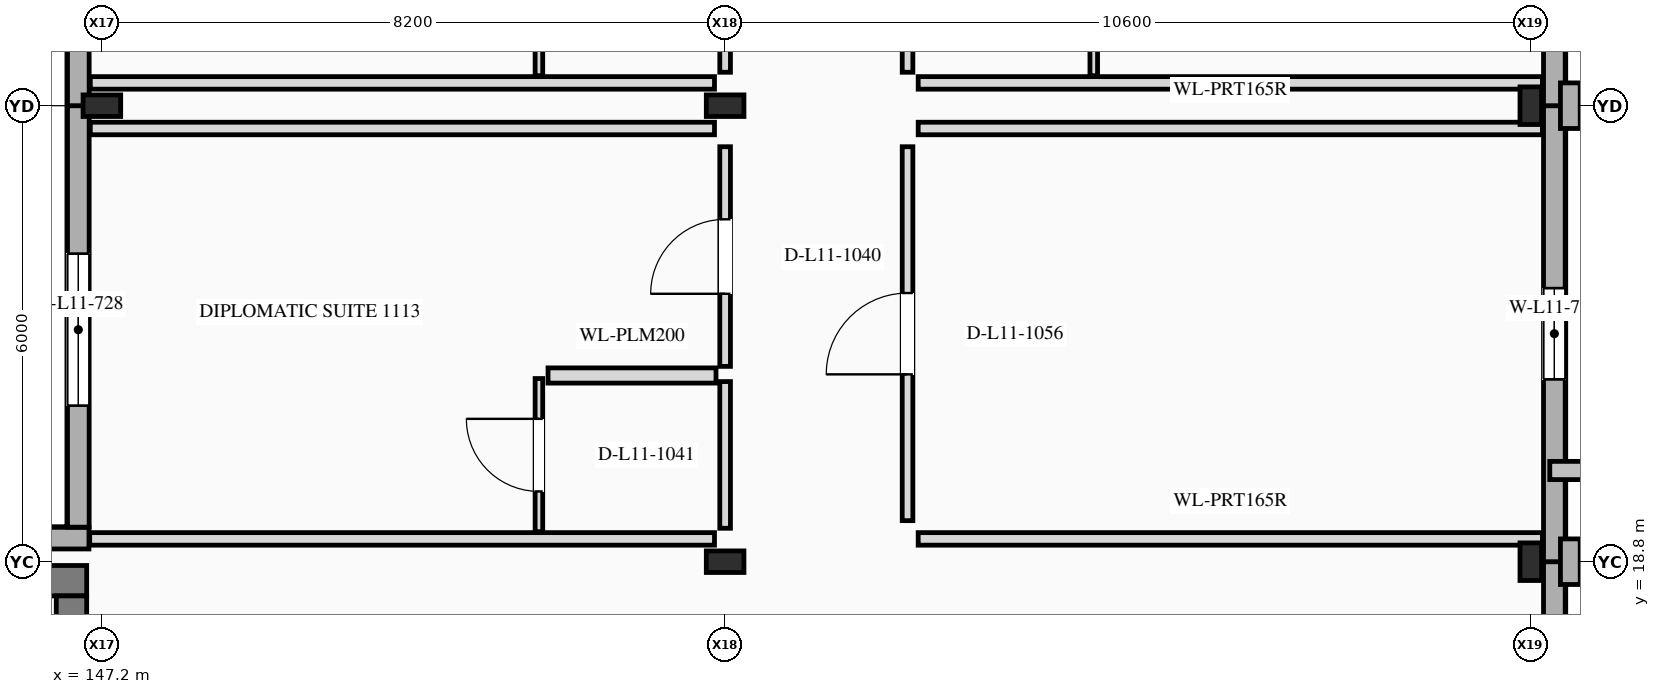
"""IFC4 building model, lengths in metres.
Left out: names, types, materials, properties, quantities, classifications, styles, units other than length and angle.
Written with IfcOpenShell. Run it as: python <this file> out.ifc"""

import sys

from ifc_helpers import new_model, si_unit, direction, frame, frame_2d, origin, origin_2d, place, context, subcontext, project, spatial, rectangle, i_section, extrude, element, fill, save


model = new_model("IFC4")
c1 = context("Model", 3, precision=1e-05, world=origin(), true_north=direction((0.0, 1.0)))
c2 = subcontext(c1, "Body", "Model", "MODEL_VIEW")
j1 = project(units=[si_unit("LENGTHUNIT", "METRE"), si_unit("PLANEANGLEUNIT", "RADIAN")], contexts=[c1])
p1 = place(None, origin())
s1 = spatial("IfcSite", under=j1, at=p1, CompositionType="ELEMENT")
p2 = place(p1, origin())
s2 = spatial("IfcBuilding", under=s1, at=p2, CompositionType="ELEMENT")
p3 = place(p2, frame((0.0, 0.0, 44.6)))
s3 = spatial("IfcBuildingStorey", under=s2, at=p3, CompositionType="ELEMENT", Elevation=44.6)
for number, where, z_axis, x_axis in (
    (1, (147.2, 24.8, 0.0), (0.0, 0.0, 1.0), (0.0, 1.0, 0.0)),
    (2, (155.4, 18.8, 0.0), (0.0, 0.0, 1.0), (0.0, 1.0, 0.0)),
    (3, (155.4, 24.8, 0.0), (0.0, 0.0, 1.0), (0.0, 1.0, 0.0)),
    (4, (166.0, 18.8, 0.0), (0.0, 0.0, 1.0), (1.0, 0.0, 0.0)),
    (5, (166.0, 24.8, 0.0), (0.0, 0.0, 1.0), (1.0, 0.0, 0.0)),
):
    element("IfcColumn", number, at=place(p3, frame(where, z_axis=z_axis, x_axis=x_axis)), inside=s3, PredefinedType="COLUMN", context=c2, shape_type="SweptSolid", body=[
        extrude(i_section(OverallWidth=0.284, OverallDepth=0.495, WebThickness=0.019, FlangeThickness=0.033, at=origin_2d()), origin(), (0.0, 0.0, 1.0), 3.6),
    ])
p4 = place(p3, frame((166.31, 8.2, 0.0), z_axis=(0.0, 0.0, 1.0), x_axis=(0.0, 1.0, 0.0)))
e6 = element("IfcWall", 6, at=p4, inside=s3, PredefinedType="STANDARD", context=c2, shape_type="SweptSolid", body=[
    extrude(rectangle(XDim=10.6, YDim=0.285, at=frame_2d((5.3, 0.0))), origin(), (0.0, 0.0, 1.0), 3.6),
])
p5 = place(p4, frame((4.55, 0.0, 0.88)))
e7 = element("IfcOpeningElement", 7, at=p5, cuts=e6, PredefinedType="OPENING", context=c2, shape_type="SweptSolid", body=[
    extrude(rectangle(XDim=1.5, YDim=1.7, at=frame_2d((0.75, 0.85))), frame((0.0, 0.152, 0.0), z_axis=(0.0, -1.0, 0.0), x_axis=(1.0, 0.0, 0.0)), (0.0, 0.0, 1.0), 0.305),
])
p6 = place(p3, frame((166.31, 18.8, 0.0), z_axis=(0.0, 0.0, 1.0), x_axis=(0.0, 1.0, 0.0)))
e8 = element("IfcWall", 8, at=p6, inside=s3, PredefinedType="STANDARD", context=c2, shape_type="SweptSolid", body=[
    extrude(rectangle(XDim=6.0, YDim=0.285, at=frame_2d((3.0, 0.0))), origin(), (0.0, 0.0, 1.0), 3.6),
])
p7 = place(p6, frame((2.4, 0.0, 0.85)))
e9 = element("IfcOpeningElement", 9, at=p7, cuts=e8, PredefinedType="OPENING", context=c2, shape_type="SweptSolid", body=[
    extrude(rectangle(XDim=1.2, YDim=1.6, at=frame_2d((0.6, 0.8))), frame((0.0, 0.152, 0.0), z_axis=(0.0, -1.0, 0.0), x_axis=(1.0, 0.0, 0.0)), (0.0, 0.0, 1.0), 0.305),
])
p8 = place(p3, frame((166.52, 18.5, 0.0), z_axis=(0.0, 0.0, 1.0), x_axis=(0.0, 1.0, 0.0)))
e10 = element("IfcWall", 10, at=p8, inside=s3, PredefinedType="ELEMENTEDWALL", context=c2, shape_type="SweptSolid", body=[
    extrude(rectangle(XDim=0.6, YDim=0.26, at=frame_2d((0.3, 0.0))), origin(), (0.0, 0.0, 1.0), 3.6),
])
p9 = place(p3, frame((166.31, 24.8, 0.0), z_axis=(0.0, 0.0, 1.0), x_axis=(0.0, 1.0, 0.0)))
e11 = element("IfcWall", 11, at=p9, inside=s3, PredefinedType="STANDARD", context=c2, shape_type="SweptSolid", body=[
    extrude(rectangle(XDim=8.4, YDim=0.285, at=frame_2d((4.2, 0.0))), origin(), (0.0, 0.0, 1.0), 3.6),
])
p10 = place(p9, frame((3.65, 0.0, 0.85)))
e12 = element("IfcOpeningElement", 12, at=p10, cuts=e11, PredefinedType="OPENING", context=c2, shape_type="SweptSolid", body=[
    extrude(rectangle(XDim=1.1, YDim=1.5, at=frame_2d((0.55, 0.75))), frame((0.0, 0.152, 0.0), z_axis=(0.0, -1.0, 0.0), x_axis=(1.0, 0.0, 0.0)), (0.0, 0.0, 1.0), 0.305),
])
p11 = place(p3, frame((166.52, 24.5, 0.0), z_axis=(0.0, 0.0, 1.0), x_axis=(0.0, 1.0, 0.0)))
e13 = element("IfcWall", 13, at=p11, inside=s3, PredefinedType="ELEMENTEDWALL", context=c2, shape_type="SweptSolid", body=[
    extrude(rectangle(XDim=0.6, YDim=0.26, at=frame_2d((0.3, 0.0))), origin(), (0.0, 0.0, 1.0), 3.6),
])
p12 = place(p3, frame((147.03, 19.11, 0.0), z_axis=(0.0, 0.0, 1.0), x_axis=(-1.0, 0.0, 0.0)))
e14 = element("IfcWall", 14, at=p12, inside=s3, PredefinedType="STANDARD", context=c2, shape_type="SweptSolid", body=[
    extrude(rectangle(XDim=11.03, YDim=0.285, at=frame_2d((5.515, 0.0))), origin(), (0.0, 0.0, 1.0), 3.6),
])
p13 = place(p3, frame((146.89, 19.254, 0.0), z_axis=(0.0, 0.0, 1.0), x_axis=(0.0, 1.0, 0.0)))
e15 = element("IfcWall", 15, at=p13, inside=s3, PredefinedType="STANDARD", context=c2, shape_type="SweptSolid", body=[
    extrude(rectangle(XDim=5.546, YDim=0.285, at=frame_2d((2.773, 0.0))), origin(), (0.0, 0.0, 1.0), 3.6),
])
p14 = place(p13, frame((1.598, 0.0, 0.85)))
e16 = element("IfcOpeningElement", 16, at=p14, cuts=e15, PredefinedType="OPENING", context=c2, shape_type="SweptSolid", body=[
    extrude(rectangle(XDim=2.0, YDim=1.65, at=frame_2d((1.0, 0.825))), frame((0.0, 0.152, 0.0), z_axis=(0.0, -1.0, 0.0), x_axis=(1.0, 0.0, 0.0)), (0.0, 0.0, 1.0), 0.305),
])
p15 = place(p3, frame((146.89, 24.8, 0.0), z_axis=(0.0, 0.0, 1.0), x_axis=(0.0, 1.0, 0.0)))
e17 = element("IfcWall", 17, at=p15, inside=s3, PredefinedType="STANDARD", context=c2, shape_type="SweptSolid", body=[
    extrude(rectangle(XDim=8.4, YDim=0.285, at=frame_2d((4.2, 0.0))), origin(), (0.0, 0.0, 1.0), 3.6),
])
p16 = place(p15, frame((3.2, 0.0, 0.85)))
e18 = element("IfcOpeningElement", 18, at=p16, cuts=e17, PredefinedType="OPENING", context=c2, shape_type="SweptSolid", body=[
    extrude(rectangle(XDim=2.0, YDim=1.65, at=frame_2d((1.0, 0.825))), frame((0.0, 0.152, 0.0), z_axis=(0.0, -1.0, 0.0), x_axis=(1.0, 0.0, 0.0)), (0.0, 0.0, 1.0), 0.305),
])
p17 = place(p3, frame((147.0, 18.55, 0.0), z_axis=(0.0, 0.0, 1.0), x_axis=(-1.0, 0.0, 0.0)))
e19 = element("IfcWall", 19, at=p17, inside=s3, PredefinedType="SHEAR", context=c2, shape_type="SweptSolid", body=[
    extrude(rectangle(XDim=10.6, YDim=0.4, at=frame_2d((5.3, 0.0))), origin(), (0.0, 0.0, 1.0), 3.6),
])
p18 = place(p3, frame((146.8, 11.0, 0.0), z_axis=(0.0, 0.0, 1.0), x_axis=(0.0, 1.0, 0.0)))
e20 = element("IfcWall", 20, at=p18, inside=s3, PredefinedType="SHEAR", context=c2, shape_type="SweptSolid", body=[
    extrude(rectangle(XDim=7.35, YDim=0.4, at=frame_2d((3.675, 0.0))), origin(), (0.0, 0.0, 1.0), 3.6),
])
p19 = place(p18, frame((5.0, 0.0, 0.0)))
e21 = element("IfcOpeningElement", 21, at=p19, cuts=e20, PredefinedType="OPENING", context=c2, shape_type="SweptSolid", body=[
    extrude(rectangle(XDim=0.95, YDim=2.2, at=frame_2d((0.475, 1.1))), frame((0.0, 0.21, 0.0), z_axis=(0.0, -1.0, 0.0), x_axis=(1.0, 0.0, 0.0)), (0.0, 0.0, 1.0), 0.42),
])
p20 = place(p18, frame((0.175, 0.0, 0.0)))
e22 = element("IfcOpeningElement", 22, at=p20, cuts=e20, PredefinedType="OPENING", context=c2, shape_type="SweptSolid", body=[
    extrude(rectangle(XDim=1.15, YDim=2.25, at=frame_2d((0.575, 1.125))), frame((0.0, 0.21, 0.0), z_axis=(0.0, -1.0, 0.0), x_axis=(1.0, 0.0, 0.0)), (0.0, 0.0, 1.0), 0.42),
])
p21 = place(p18, frame((1.875, 0.0, 0.0)))
e23 = element("IfcOpeningElement", 23, at=p21, cuts=e20, PredefinedType="OPENING", context=c2, shape_type="SweptSolid", body=[
    extrude(rectangle(XDim=1.15, YDim=2.25, at=frame_2d((0.575, 1.125))), frame((0.0, 0.21, 0.0), z_axis=(0.0, -1.0, 0.0), x_axis=(1.0, 0.0, 0.0)), (0.0, 0.0, 1.0), 0.42),
])
p22 = place(p3, frame((155.4, 19.24, 0.0), z_axis=(0.0, 0.0, 1.0), x_axis=(0.0, 1.0, 0.0)))
e24 = element("IfcWall", 24, at=p22, inside=s3, PredefinedType="PARTITIONING", context=c2, shape_type="SweptSolid", body=[
    extrude(rectangle(XDim=1.93, YDim=0.14, at=frame_2d((0.965, 0.0))), origin(), (0.0, 0.0, 1.0), 2.774),
])
p23 = place(p3, frame((155.4, 21.37, 0.0), z_axis=(0.0, 0.0, 1.0), x_axis=(0.0, 1.0, 0.0)))
e25 = element("IfcWall", 25, at=p23, inside=s3, PredefinedType="PARTITIONING", context=c2, shape_type="SweptSolid", body=[
    extrude(rectangle(XDim=2.89, YDim=0.14, at=frame_2d((1.445, 0.0))), origin(), (0.0, 0.0, 1.0), 2.774),
])
p24 = place(p23, frame((0.955, 0.0, 0.0)))
e26 = element("IfcOpeningElement", 26, at=p24, cuts=e25, PredefinedType="OPENING", context=c2, shape_type="SweptSolid", body=[
    extrude(rectangle(XDim=0.98, YDim=2.2, at=frame_2d((0.49, 1.1))), frame((0.0, 0.08, 0.0), z_axis=(0.0, -1.0, 0.0), x_axis=(1.0, 0.0, 0.0)), (0.0, 0.0, 1.0), 0.16),
])
p25 = place(p3, frame((147.04, 19.1, 0.0), z_axis=(0.0, 0.0, 1.0), x_axis=(1.0, 0.0, 0.0)))
e27 = element("IfcWall", 27, at=p25, inside=s3, PredefinedType="PARTITIONING", context=c2, shape_type="SweptSolid", body=[
    extrude(rectangle(XDim=8.22, YDim=0.165, at=frame_2d((4.11, 0.0))), origin(), (0.0, 0.0, 1.0), 3.3),
])
p26 = place(p3, frame((147.048, 24.5, 0.0), z_axis=(0.0, 0.0, 1.0), x_axis=(1.0, 0.0, 0.0)))
e28 = element("IfcWall", 28, at=p26, inside=s3, PredefinedType="PARTITIONING", context=c2, shape_type="SweptSolid", body=[
    extrude(rectangle(XDim=8.212, YDim=0.165, at=frame_2d((4.106, 0.0))), origin(), (0.0, 0.0, 1.0), 2.713),
])
p27 = place(p3, frame((153.07, 21.25, 0.0), z_axis=(0.0, 0.0, 1.0), x_axis=(1.0, 0.0, 0.0)))
e29 = element("IfcWall", 29, at=p27, inside=s3, PredefinedType="PLUMBINGWALL", context=c2, shape_type="SweptSolid", body=[
    extrude(rectangle(XDim=2.21, YDim=0.2, at=frame_2d((1.105, 0.0))), origin(), (0.0, 0.0, 1.0), 3.3),
])
p28 = place(p3, frame((152.95, 19.195, 0.0), z_axis=(0.0, 0.0, 1.0), x_axis=(0.0, 1.0, 0.0)))
e30 = element("IfcWall", 30, at=p28, inside=s3, PredefinedType="PARTITIONING", context=c2, shape_type="SweptSolid", body=[
    extrude(rectangle(XDim=2.015, YDim=0.1, at=frame_2d((1.008, 0.0))), origin(), (0.0, 0.0, 1.0), 3.3),
])
p29 = place(p28, frame((0.53, 0.0, 0.0)))
e31 = element("IfcOpeningElement", 31, at=p29, cuts=e30, PredefinedType="OPENING", context=c2, shape_type="SweptSolid", body=[
    extrude(rectangle(XDim=0.955, YDim=2.22, at=frame_2d((0.478, 1.11))), frame((0.0, 0.06, 0.0), z_axis=(0.0, -1.0, 0.0), x_axis=(1.0, 0.0, 0.0)), (0.0, 0.0, 1.0), 0.12),
])
p30 = place(p3, frame((157.8, 25.24, 0.0), z_axis=(0.0, 0.0, 1.0), x_axis=(0.0, 1.0, 0.0)))
e32 = element("IfcWall", 32, at=p30, inside=s3, PredefinedType="PARTITIONING", context=c2, shape_type="SweptSolid", body=[
    extrude(rectangle(XDim=1.93, YDim=0.14, at=frame_2d((0.965, 0.0))), origin(), (0.0, 0.0, 1.0), 2.858),
])
p31 = place(p3, frame((157.94, 25.1, 0.0), z_axis=(0.0, 0.0, 1.0), x_axis=(1.0, 0.0, 0.0)))
e33 = element("IfcWall", 33, at=p31, inside=s3, PredefinedType="PARTITIONING", context=c2, shape_type="SweptSolid", body=[
    extrude(rectangle(XDim=8.213, YDim=0.165, at=frame_2d((4.106, 0.0))), origin(), (0.0, 0.0, 1.0), 2.69),
])
p32 = place(p3, frame((160.25, 25.195, 0.0), z_axis=(0.0, 0.0, 1.0), x_axis=(0.0, 1.0, 0.0)))
e34 = element("IfcWall", 34, at=p32, inside=s3, PredefinedType="PARTITIONING", context=c2, shape_type="SweptSolid", body=[
    extrude(rectangle(XDim=2.015, YDim=0.1, at=frame_2d((1.008, 0.0))), origin(), (0.0, 0.0, 1.0), 2.858),
])
p33 = place(p32, frame((0.568, 0.0, 0.0)))
e35 = element("IfcOpeningElement", 35, at=p33, cuts=e34, PredefinedType="OPENING", context=c2, shape_type="SweptSolid", body=[
    extrude(rectangle(XDim=0.88, YDim=2.1, at=frame_2d((0.44, 1.05))), frame((0.0, 0.06, 0.0), z_axis=(0.0, -1.0, 0.0), x_axis=(1.0, 0.0, 0.0)), (0.0, 0.0, 1.0), 0.12),
])
p34 = place(p3, frame((155.4, 25.24, 0.0), z_axis=(0.0, 0.0, 1.0), x_axis=(0.0, 1.0, 0.0)))
e36 = element("IfcWall", 36, at=p34, inside=s3, PredefinedType="PARTITIONING", context=c2, shape_type="SweptSolid", body=[
    extrude(rectangle(XDim=1.93, YDim=0.14, at=frame_2d((0.965, 0.0))), origin(), (0.0, 0.0, 1.0), 2.774),
])
p35 = place(p3, frame((147.048, 25.1, 0.0), z_axis=(0.0, 0.0, 1.0), x_axis=(1.0, 0.0, 0.0)))
e37 = element("IfcWall", 37, at=p35, inside=s3, PredefinedType="PARTITIONING", context=c2, shape_type="SweptSolid", body=[
    extrude(rectangle(XDim=8.212, YDim=0.165, at=frame_2d((4.106, 0.0))), origin(), (0.0, 0.0, 1.0), 2.713),
])
p36 = place(p3, frame((152.95, 25.195, 0.0), z_axis=(0.0, 0.0, 1.0), x_axis=(0.0, 1.0, 0.0)))
e38 = element("IfcWall", 38, at=p36, inside=s3, PredefinedType="PARTITIONING", context=c2, shape_type="SweptSolid", body=[
    extrude(rectangle(XDim=2.015, YDim=0.1, at=frame_2d((1.008, 0.0))), origin(), (0.0, 0.0, 1.0), 2.908),
])
p37 = place(p36, frame((0.555, 0.0, 0.0)))
e39 = element("IfcOpeningElement", 39, at=p37, cuts=e38, PredefinedType="OPENING", context=c2, shape_type="SweptSolid", body=[
    extrude(rectangle(XDim=0.905, YDim=2.1, at=frame_2d((0.453, 1.05))), frame((0.0, 0.06, 0.0), z_axis=(0.0, -1.0, 0.0), x_axis=(1.0, 0.0, 0.0)), (0.0, 0.0, 1.0), 0.12),
])
p38 = place(p3, frame((157.8, 19.34, 0.0), z_axis=(0.0, 0.0, 1.0), x_axis=(0.0, 1.0, 0.0)))
e40 = element("IfcWall", 40, at=p38, inside=s3, PredefinedType="PARTITIONING", context=c2, shape_type="SweptSolid", body=[
    extrude(rectangle(XDim=4.92, YDim=0.14, at=frame_2d((2.46, 0.0))), origin(), (0.0, 0.0, 1.0), 2.858),
])
p39 = place(p38, frame((1.925, 0.0, 0.0)))
e41 = element("IfcOpeningElement", 41, at=p39, cuts=e40, PredefinedType="OPENING", context=c2, shape_type="SweptSolid", body=[
    extrude(rectangle(XDim=1.07, YDim=2.4, at=frame_2d((0.535, 1.2))), frame((0.0, 0.08, 0.0), z_axis=(0.0, -1.0, 0.0), x_axis=(1.0, 0.0, 0.0)), (0.0, 0.0, 1.0), 0.16),
])
for number, where, z_axis, x_axis in (
    (42, (157.94, 19.1, 0.0), (0.0, 0.0, 1.0), (1.0, 0.0, 0.0)),
    (43, (157.94, 24.5, 0.0), (0.0, 0.0, 1.0), (1.0, 0.0, 0.0)),
):
    element("IfcWall", number, at=place(p3, frame(where, z_axis=z_axis, x_axis=x_axis)), inside=s3, PredefinedType="PARTITIONING", context=c2, shape_type="SweptSolid", body=[
        extrude(rectangle(XDim=8.213, YDim=0.165, at=frame_2d((4.106, 0.0))), origin(), (0.0, 0.0, 1.0), 2.69),
    ])
p40 = place(p7, origin())
e44 = element("IfcWindow", 44, at=p40, inside=s3, PartitioningType="SINGLE_PANEL", PredefinedType="WINDOW", context=c2, shape_type="SweptSolid", body=[
    extrude(rectangle(XDim=1.2, YDim=1.6, at=frame_2d((0.6, 0.8))), frame((0.0, 0.03, 0.0), z_axis=(0.0, -1.0, 0.0), x_axis=(1.0, 0.0, 0.0)), (0.0, 0.0, 1.0), 0.06),
])
fill(e9, e44)
p41 = place(p14, origin())
e45 = element("IfcWindow", 45, at=p41, inside=s3, PartitioningType="SINGLE_PANEL", PredefinedType="WINDOW", context=c2, shape_type="SweptSolid", body=[
    extrude(rectangle(XDim=2.0, YDim=1.65, at=frame_2d((1.0, 0.825))), frame((0.0, 0.03, 0.0), z_axis=(0.0, -1.0, 0.0), x_axis=(1.0, 0.0, 0.0)), (0.0, 0.0, 1.0), 0.06),
])
fill(e16, e45)
p42 = place(p24, origin())
e46 = element("IfcDoor", 46, at=p42, inside=s3, OperationType="SINGLE_SWING_LEFT", PredefinedType="DOOR", context=c2, shape_type="SweptSolid", body=[
    extrude(rectangle(XDim=0.98, YDim=2.2, at=frame_2d((0.49, 1.1))), frame((0.0, 0.025, 0.0), z_axis=(0.0, -1.0, 0.0), x_axis=(1.0, 0.0, 0.0)), (0.0, 0.0, 1.0), 0.05),
])
fill(e26, e46)
p43 = place(p29, origin())
e47 = element("IfcDoor", 47, at=p43, inside=s3, OperationType="SINGLE_SWING_RIGHT", PredefinedType="DOOR", context=c2, shape_type="SweptSolid", body=[
    extrude(rectangle(XDim=0.955, YDim=2.22, at=frame_2d((0.478, 1.11))), frame((0.0, 0.025, 0.0), z_axis=(0.0, -1.0, 0.0), x_axis=(1.0, 0.0, 0.0)), (0.0, 0.0, 1.0), 0.05),
])
fill(e31, e47)
p44 = place(p39, origin())
e48 = element("IfcDoor", 48, at=p44, inside=s3, OperationType="SINGLE_SWING_LEFT", PredefinedType="DOOR", context=c2, shape_type="SweptSolid", body=[
    extrude(rectangle(XDim=1.07, YDim=2.4, at=frame_2d((0.535, 1.2))), frame((0.0, 0.025, 0.0), z_axis=(0.0, -1.0, 0.0), x_axis=(1.0, 0.0, 0.0)), (0.0, 0.0, 1.0), 0.05),
])
fill(e41, e48)
save(model, sys.argv[1])
